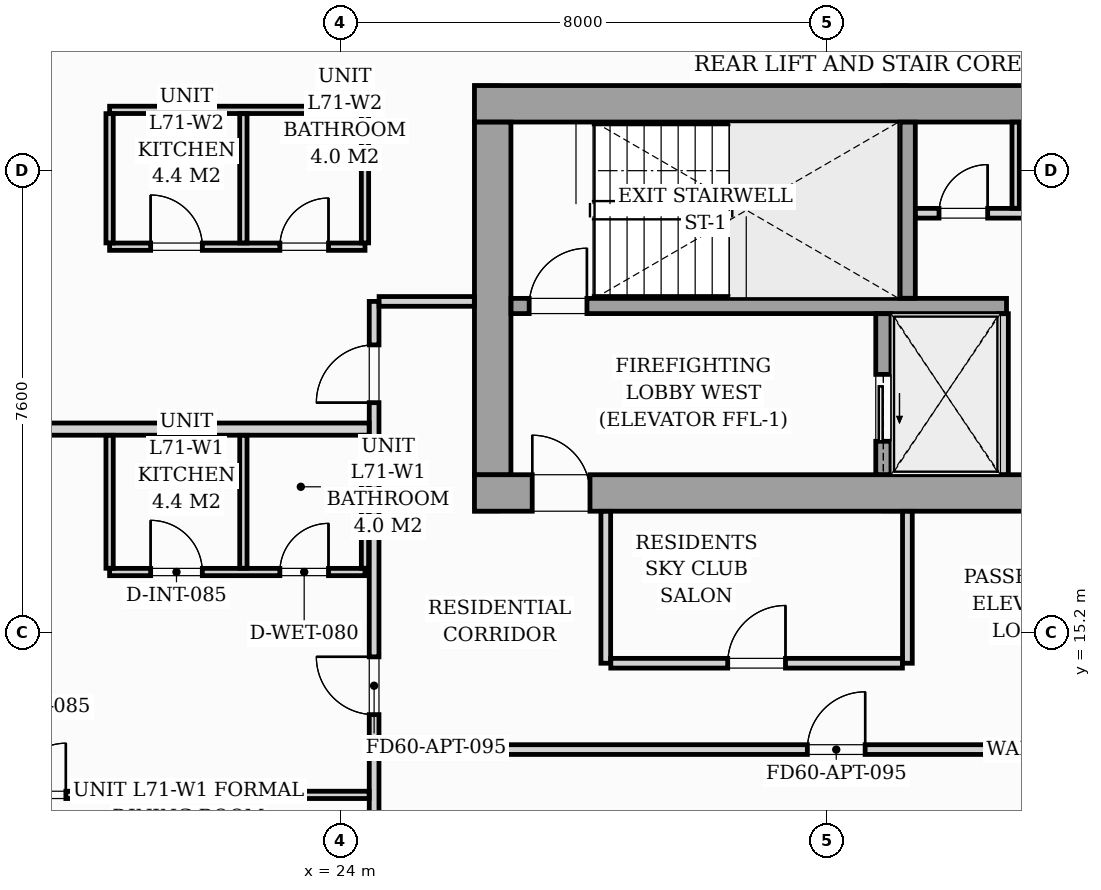
"""IFC4 building model, lengths in metres.
Left out: names, types, materials, properties, quantities, classifications, styles, units other than length and angle.
Written with IfcOpenShell. Run it as: python <this file> out.ifc"""

import sys

from ifc_helpers import new_model, si_unit, direction, frame, frame_2d, origin, origin_2d, place, context, subcontext, project, spatial, rectangle, i_section, extrude, source, transform, mapped, element, fill, save


model = new_model("IFC4")
c1 = context("Model", 3, precision=1e-05, world=origin(), true_north=direction((0.0, 1.0)))
c2 = subcontext(c1, "Body", "Model", "MODEL_VIEW")
j1 = project(units=[si_unit("LENGTHUNIT", "METRE"), si_unit("PLANEANGLEUNIT", "RADIAN")], contexts=[c1])
p1 = place(None, origin())
s1 = spatial("IfcSite", under=j1, at=p1, CompositionType="ELEMENT")
p2 = place(p1, origin())
s2 = spatial("IfcBuilding", under=s1, at=p2, CompositionType="ELEMENT")
p3 = place(p2, frame((0.0, 0.0, 246.3)))
s3 = spatial("IfcBuildingStorey", under=s2, at=p3, CompositionType="ELEMENT", Elevation=246.3)
m1 = source(origin(), c2, "Body", "SweptSolid", [
    extrude(i_section(OverallWidth=0.409, OverallDepth=0.425, WebThickness=0.033, FlangeThickness=0.052, FilletRadius=0.018, at=origin_2d()), origin(), (0.0, 0.0, 1.0), 3.296),
])
for number, where, z_axis, x_axis in (
    (1, (26.4, 17.4, 0.002), (0.0, 0.0, 1.0), (1.0, 0.0, 0.0)),
    (2, (33.12, 17.4, 0.002), (0.0, 0.0, 1.0), (1.0, 0.0, 0.0)),
    (3, (26.4, 24.0, 0.002), (0.0, 0.0, 1.0), (1.0, 0.0, 0.0)),
    (4, (33.12, 24.0, 0.002), (0.0, 0.0, 1.0), (1.0, 0.0, 0.0)),
):
    element("IfcColumn", number, at=place(p3, frame(where, z_axis=z_axis, x_axis=x_axis)), inside=s3, PredefinedType="PILASTER", context=c2, shape_type="MappedRepresentation", body=[
        mapped(m1, transform((0.0, 0.0, 0.0), scale=1.0)),
    ])
p4 = place(p3, frame((26.2, 17.5, 0.0), z_axis=(0.0, 0.0, 1.0), x_axis=(1.0, 0.0, 0.0)))
e5 = element("IfcWall", 5, at=p4, inside=s3, PredefinedType="SHEAR", context=c2, shape_type="SweptSolid", body=[
    extrude(rectangle(XDim=19.6, YDim=0.6, at=frame_2d((9.8, 0.0))), origin(), (0.0, 0.0, 1.0), 3.3),
])
p5 = place(p4, frame((0.95, 0.0, 0.0)))
e6 = element("IfcOpeningElement", 6, at=p5, cuts=e5, PredefinedType="OPENING", context=c2, shape_type="SweptSolid", body=[
    extrude(rectangle(XDim=0.95, YDim=2.06, at=frame_2d((0.475, 1.03))), frame((0.0, 0.31, 0.0), z_axis=(0.0, -1.0, 0.0), x_axis=(1.0, 0.0, 0.0)), (0.0, 0.0, 1.0), 0.62),
])
p6 = place(p4, frame((9.38, 0.0, 0.0)))
e7 = element("IfcOpeningElement", 7, at=p6, cuts=e5, PredefinedType="OPENING", context=c2, shape_type="SweptSolid", body=[
    extrude(rectangle(XDim=0.85, YDim=2.0, at=frame_2d((0.425, 1.0))), frame((0.0, 0.31, 0.0), z_axis=(0.0, -1.0, 0.0), x_axis=(1.0, 0.0, 0.0)), (0.0, 0.0, 1.0), 0.62),
])
p7 = place(p4, frame((17.55, 0.0, 0.0)))
e8 = element("IfcOpeningElement", 8, at=p7, cuts=e5, PredefinedType="OPENING", context=c2, shape_type="SweptSolid", body=[
    extrude(rectangle(XDim=0.95, YDim=2.06, at=frame_2d((0.475, 1.03))), frame((0.0, 0.31, 0.0), z_axis=(0.0, -1.0, 0.0), x_axis=(1.0, 0.0, 0.0)), (0.0, 0.0, 1.0), 0.62),
])
p8 = place(p3, frame((26.2, 23.9, 0.0), z_axis=(0.0, 0.0, 1.0), x_axis=(1.0, 0.0, 0.0)))
e9 = element("IfcWall", 9, at=p8, inside=s3, PredefinedType="SHEAR", context=c2, shape_type="SweptSolid", body=[
    extrude(rectangle(XDim=19.6, YDim=0.6, at=frame_2d((9.8, 0.0))), origin(), (0.0, 0.0, 1.0), 3.3),
])
p9 = place(p3, frame((26.5, 17.802, 0.0), z_axis=(0.0, 0.0, 1.0), x_axis=(0.0, 1.0, 0.0)))
e10 = element("IfcWall", 10, at=p9, inside=s3, PredefinedType="SHEAR", context=c2, shape_type="SweptSolid", body=[
    extrude(rectangle(XDim=5.796, YDim=0.6, at=frame_2d((2.898, 0.0))), origin(), (0.0, 0.0, 1.0), 3.3),
])
p10 = place(p3, frame((26.802, 20.575, 0.0), z_axis=(0.0, 0.0, 1.0), x_axis=(1.0, 0.0, 0.0)))
e11 = element("IfcWall", 11, at=p10, inside=s3, PredefinedType="SOLIDWALL", context=c2, shape_type="SweptSolid", body=[
    extrude(rectangle(XDim=8.148, YDim=0.25, at=frame_2d((4.074, 0.0))), origin(), (0.0, 0.0, 1.0), 3.3),
])
p11 = place(p10, frame((0.298, 0.0, 0.0)))
e12 = element("IfcOpeningElement", 12, at=p11, cuts=e11, PredefinedType="OPENING", context=c2, shape_type="SweptSolid", body=[
    extrude(rectangle(XDim=0.95, YDim=2.06, at=frame_2d((0.475, 1.03))), frame((0.0, 0.135, 0.0), z_axis=(0.0, -1.0, 0.0), x_axis=(1.0, 0.0, 0.0)), (0.0, 0.0, 1.0), 0.27),
])
p12 = place(p3, frame((33.325, 20.702, 0.0), z_axis=(0.0, 0.0, 1.0), x_axis=(0.0, 1.0, 0.0)))
e13 = element("IfcWall", 13, at=p12, inside=s3, PredefinedType="SOLIDWALL", context=c2, shape_type="SweptSolid", body=[
    extrude(rectangle(XDim=2.896, YDim=0.25, at=frame_2d((1.448, 0.0))), origin(), (0.0, 0.0, 1.0), 3.3),
])
p13 = place(p3, frame((32.925, 17.802, 0.0), z_axis=(0.0, 0.0, 1.0), x_axis=(0.0, 1.0, 0.0)))
e14 = element("IfcWall", 14, at=p13, inside=s3, PredefinedType="SOLIDWALL", context=c2, shape_type="SweptSolid", body=[
    extrude(rectangle(XDim=2.646, YDim=0.25, at=frame_2d((1.323, 0.0))), origin(), (0.0, 0.0, 1.0), 3.3),
])
p14 = place(p13, frame((0.548, 0.0, 0.0)))
e15 = element("IfcOpeningElement", 15, at=p14, cuts=e14, PredefinedType="OPENING", context=c2, shape_type="SweptSolid", body=[
    extrude(rectangle(XDim=1.1, YDim=2.08, at=frame_2d((0.55, 1.04))), frame((0.0, 0.135, 0.0), z_axis=(0.0, -1.0, 0.0), x_axis=(1.0, 0.0, 0.0)), (0.0, 0.0, 1.0), 0.27),
])
p15 = place(p3, frame((34.9, 17.802, 0.0), z_axis=(0.0, 0.0, 1.0), x_axis=(0.0, 1.0, 0.0)))
e16 = element("IfcWall", 16, at=p15, inside=s3, PredefinedType="PARTITIONING", context=c2, shape_type="SweptSolid", body=[
    extrude(rectangle(XDim=2.646, YDim=0.16, at=frame_2d((1.323, 0.0))), origin(), (0.0, 0.0, 1.0), 3.04),
])
p16 = place(p3, frame((33.452, 22.1, 0.0), z_axis=(0.0, 0.0, 1.0), x_axis=(1.0, 0.0, 0.0)))
e17 = element("IfcWall", 17, at=p16, inside=s3, PredefinedType="PARTITIONING", context=c2, shape_type="SweptSolid", body=[
    extrude(rectangle(XDim=5.096, YDim=0.16, at=frame_2d((2.548, 0.0))), origin(), (0.0, 0.0, 1.0), 3.04),
])
p17 = place(p16, frame((0.388, 0.0, 0.0)))
e18 = element("IfcOpeningElement", 18, at=p17, cuts=e17, PredefinedType="OPENING", context=c2, shape_type="SweptSolid", body=[
    extrude(rectangle(XDim=0.8, YDim=2.05, at=frame_2d((0.4, 1.025))), frame((0.0, 0.09, 0.0), z_axis=(0.0, -1.0, 0.0), x_axis=(1.0, 0.0, 0.0)), (0.0, 0.0, 1.0), 0.18),
])
p18 = place(p16, frame((2.148, 0.0, 0.0)))
e19 = element("IfcOpeningElement", 19, at=p18, cuts=e17, PredefinedType="OPENING", context=c2, shape_type="SweptSolid", body=[
    extrude(rectangle(XDim=0.8, YDim=2.05, at=frame_2d((0.4, 1.025))), frame((0.0, 0.09, 0.0), z_axis=(0.0, -1.0, 0.0), x_axis=(1.0, 0.0, 0.0)), (0.0, 0.0, 1.0), 0.18),
])
p19 = place(p16, frame((3.908, 0.0, 0.0)))
e20 = element("IfcOpeningElement", 20, at=p19, cuts=e17, PredefinedType="OPENING", context=c2, shape_type="SweptSolid", body=[
    extrude(rectangle(XDim=0.8, YDim=2.05, at=frame_2d((0.4, 1.025))), frame((0.0, 0.09, 0.0), z_axis=(0.0, -1.0, 0.0), x_axis=(1.0, 0.0, 0.0)), (0.0, 0.0, 1.0), 0.18),
])
p20 = place(p3, frame((35.1, 22.182, 0.0), z_axis=(0.0, 0.0, 1.0), x_axis=(0.0, 1.0, 0.0)))
e21 = element("IfcWall", 21, at=p20, inside=s3, PredefinedType="PARTITIONING", context=c2, shape_type="SweptSolid", body=[
    extrude(rectangle(XDim=1.416, YDim=0.12, at=frame_2d((0.708, 0.0))), origin(), (0.0, 0.0, 1.0), 3.04),
])
p21 = place(p3, frame((24.55, 13.28, 0.0), z_axis=(0.0, 0.0, 1.0), x_axis=(1.0, 0.0, 0.0)))
e22 = element("IfcWall", 22, at=p21, inside=s3, PredefinedType="PARTITIONING", context=c2, shape_type="SweptSolid", body=[
    extrude(rectangle(XDim=22.9, YDim=0.16, at=frame_2d((11.45, 0.0))), origin(), (0.0, 0.0, 1.0), 2.556),
])
p22 = place(p21, frame((7.125, 0.0, 0.0)))
e23 = element("IfcOpeningElement", 23, at=p22, cuts=e22, PredefinedType="OPENING", context=c2, shape_type="SweptSolid", body=[
    extrude(rectangle(XDim=0.95, YDim=2.06, at=frame_2d((0.475, 1.03))), frame((0.0, 0.09, 0.0), z_axis=(0.0, -1.0, 0.0), x_axis=(1.0, 0.0, 0.0)), (0.0, 0.0, 1.0), 0.18),
])
p23 = place(p3, frame((24.55, 10.077, 0.0), z_axis=(0.0, 0.0, 1.0), x_axis=(0.0, 1.0, 0.0)))
e24 = element("IfcWall", 24, at=p23, inside=s3, PredefinedType="PARTITIONING", context=c2, shape_type="SweptSolid", body=[
    extrude(rectangle(XDim=3.121, YDim=0.16, at=frame_2d((1.561, 0.0))), origin(), (0.0, 0.0, 1.0), 3.04),
])
p24 = place(p3, frame((24.55, 13.362, 0.0), z_axis=(0.0, 0.0, 1.0), x_axis=(0.0, 1.0, 0.0)))
e25 = element("IfcWall", 25, at=p24, inside=s3, PredefinedType="PARTITIONING", context=c2, shape_type="SweptSolid", body=[
    extrude(rectangle(XDim=7.288, YDim=0.16, at=frame_2d((3.644, 0.0))), origin(), (0.0, 0.0, 1.0), 3.04),
])
p25 = place(p24, frame((0.493, 0.0, 0.0)))
e26 = element("IfcOpeningElement", 26, at=p25, cuts=e25, PredefinedType="OPENING", context=c2, shape_type="SweptSolid", body=[
    extrude(rectangle(XDim=0.95, YDim=2.06, at=frame_2d((0.475, 1.03))), frame((0.0, 0.09, 0.0), z_axis=(0.0, -1.0, 0.0), x_axis=(1.0, 0.0, 0.0)), (0.0, 0.0, 1.0), 0.18),
])
p26 = place(p24, frame((5.623, 0.0, 0.0)))
e27 = element("IfcOpeningElement", 27, at=p26, cuts=e25, PredefinedType="OPENING", context=c2, shape_type="SweptSolid", body=[
    extrude(rectangle(XDim=0.95, YDim=2.06, at=frame_2d((0.475, 1.03))), frame((0.0, 0.09, 0.0), z_axis=(0.0, -1.0, 0.0), x_axis=(1.0, 0.0, 0.0)), (0.0, 0.0, 1.0), 0.18),
])
p27 = place(p3, frame((24.632, 20.65, 0.0), z_axis=(0.0, 0.0, 1.0), x_axis=(1.0, 0.0, 0.0)))
e28 = element("IfcWall", 28, at=p27, inside=s3, PredefinedType="PARTITIONING", context=c2, shape_type="SweptSolid", body=[
    extrude(rectangle(XDim=1.566, YDim=0.16, at=frame_2d((0.783, 0.0))), origin(), (0.0, 0.0, 1.0), 3.04),
])
p28 = place(p3, frame((9.434, 18.55, 0.0), z_axis=(0.0, 0.0, 1.0), x_axis=(1.0, 0.0, 0.0)))
e29 = element("IfcWall", 29, at=p28, inside=s3, PredefinedType="PARTITIONING", context=c2, shape_type="SweptSolid", body=[
    extrude(rectangle(XDim=15.034, YDim=0.2, at=frame_2d((7.517, 0.0))), origin(), (0.0, 0.0, 1.0), 2.381),
])
p29 = place(p3, frame((20.2, 16.2, 0.0), z_axis=(0.0, 0.0, 1.0), x_axis=(1.0, 0.0, 0.0)))
e30 = element("IfcWall", 30, at=p29, inside=s3, PredefinedType="PARTITIONING", context=c2, shape_type="SweptSolid", body=[
    extrude(rectangle(XDim=4.2, YDim=0.12, at=frame_2d((2.1, 0.0))), origin(), (0.0, 0.0, 1.0), 3.04),
])
p30 = place(p29, frame((0.675, 0.0, 0.0)))
e31 = element("IfcOpeningElement", 31, at=p30, cuts=e30, PredefinedType="OPENING", context=c2, shape_type="SweptSolid", body=[
    extrude(rectangle(XDim=0.85, YDim=2.05, at=frame_2d((0.425, 1.025))), frame((0.0, 0.07, 0.0), z_axis=(0.0, -1.0, 0.0), x_axis=(1.0, 0.0, 0.0)), (0.0, 0.0, 1.0), 0.14),
])
p31 = place(p29, frame((2.8, 0.0, 0.0)))
e32 = element("IfcOpeningElement", 32, at=p31, cuts=e30, PredefinedType="OPENING", context=c2, shape_type="SweptSolid", body=[
    extrude(rectangle(XDim=0.8, YDim=2.02, at=frame_2d((0.4, 1.01))), frame((0.0, 0.07, 0.0), z_axis=(0.0, -1.0, 0.0), x_axis=(1.0, 0.0, 0.0)), (0.0, 0.0, 1.0), 0.14),
])
for number, where, z_axis, x_axis in (
    (33, (20.2, 16.262, 0.0), (0.0, 0.0, 1.0), (0.0, 1.0, 0.0)),
    (34, (22.4, 16.262, 0.0), (0.0, 0.0, 1.0), (0.0, 1.0, 0.0)),
    (35, (24.4, 16.262, 0.0), (0.0, 0.0, 1.0), (0.0, 1.0, 0.0)),
):
    element("IfcWall", number, at=place(p3, frame(where, z_axis=z_axis, x_axis=x_axis)), inside=s3, PredefinedType="PARTITIONING", context=c2, shape_type="SweptSolid", body=[
        extrude(rectangle(XDim=2.186, YDim=0.12, at=frame_2d((1.093, 0.0))), origin(), (0.0, 0.0, 1.0), 3.04),
    ])
p32 = place(p3, frame((13.643, 12.535, 0.0), z_axis=(0.0, 0.0, 1.0), x_axis=(1.0, 0.0, 0.0)))
e36 = element("IfcWall", 36, at=p32, inside=s3, PredefinedType="PARTITIONING", context=c2, shape_type="SweptSolid", body=[
    extrude(rectangle(XDim=10.825, YDim=0.12, at=frame_2d((5.413, 0.0))), origin(), (0.0, 0.0, 1.0), 3.04),
])
p33 = place(p32, frame((4.988, 0.0, 0.0)))
e37 = element("IfcOpeningElement", 37, at=p33, cuts=e36, PredefinedType="OPENING", context=c2, shape_type="SweptSolid", body=[
    extrude(rectangle(XDim=0.85, YDim=2.05, at=frame_2d((0.425, 1.025))), frame((0.0, 0.07, 0.0), z_axis=(0.0, -1.0, 0.0), x_axis=(1.0, 0.0, 0.0)), (0.0, 0.0, 1.0), 0.14),
])
p34 = place(p3, frame((20.2, 21.55, 0.0), z_axis=(0.0, 0.0, 1.0), x_axis=(1.0, 0.0, 0.0)))
e38 = element("IfcWall", 38, at=p34, inside=s3, PredefinedType="PARTITIONING", context=c2, shape_type="SweptSolid", body=[
    extrude(rectangle(XDim=4.2, YDim=0.12, at=frame_2d((2.1, 0.0))), origin(), (0.0, 0.0, 1.0), 3.04),
])
p35 = place(p34, frame((0.675, 0.0, 0.0)))
e39 = element("IfcOpeningElement", 39, at=p35, cuts=e38, PredefinedType="OPENING", context=c2, shape_type="SweptSolid", body=[
    extrude(rectangle(XDim=0.85, YDim=2.05, at=frame_2d((0.425, 1.025))), frame((0.0, 0.07, 0.0), z_axis=(0.0, -1.0, 0.0), x_axis=(1.0, 0.0, 0.0)), (0.0, 0.0, 1.0), 0.14),
])
p36 = place(p34, frame((2.8, 0.0, 0.0)))
e40 = element("IfcOpeningElement", 40, at=p36, cuts=e38, PredefinedType="OPENING", context=c2, shape_type="SweptSolid", body=[
    extrude(rectangle(XDim=0.8, YDim=2.02, at=frame_2d((0.4, 1.01))), frame((0.0, 0.07, 0.0), z_axis=(0.0, -1.0, 0.0), x_axis=(1.0, 0.0, 0.0)), (0.0, 0.0, 1.0), 0.14),
])
p37 = place(p3, frame((20.2, 23.8, 0.0), z_axis=(0.0, 0.0, 1.0), x_axis=(1.0, 0.0, 0.0)))
e41 = element("IfcWall", 41, at=p37, inside=s3, PredefinedType="PARTITIONING", context=c2, shape_type="SweptSolid", body=[
    extrude(rectangle(XDim=4.2, YDim=0.12, at=frame_2d((2.1, 0.0))), origin(), (0.0, 0.0, 1.0), 3.04),
])
for number, where, z_axis, x_axis in (
    (42, (20.2, 21.612, 0.0), (0.0, 0.0, 1.0), (0.0, 1.0, 0.0)),
    (43, (22.4, 21.612, 0.0), (0.0, 0.0, 1.0), (0.0, 1.0, 0.0)),
    (44, (24.4, 21.612, 0.0), (0.0, 0.0, 1.0), (0.0, 1.0, 0.0)),
):
    element("IfcWall", number, at=place(p3, frame(where, z_axis=z_axis, x_axis=x_axis)), inside=s3, PredefinedType="PARTITIONING", context=c2, shape_type="SweptSolid", body=[
        extrude(rectangle(XDim=2.126, YDim=0.12, at=frame_2d((1.063, 0.0))), origin(), (0.0, 0.0, 1.0), 3.04),
    ])
for number, where, z_axis, x_axis in (
    (45, (28.36, 14.7, 0.0), (0.0, 0.0, 1.0), (0.0, 1.0, 0.0)),
    (46, (33.32, 14.7, 0.0), (0.0, 0.0, 1.0), (0.0, 1.0, 0.0)),
):
    element("IfcWall", number, at=place(p3, frame(where, z_axis=z_axis, x_axis=x_axis)), inside=s3, PredefinedType="PARTITIONING", context=c2, shape_type="SweptSolid", body=[
        extrude(rectangle(XDim=2.498, YDim=0.16, at=frame_2d((1.249, 0.0))), origin(), (0.0, 0.0, 1.0), 3.04),
    ])
p38 = place(p3, frame((28.442, 14.7, 0.0), z_axis=(0.0, 0.0, 1.0), x_axis=(1.0, 0.0, 0.0)))
e47 = element("IfcWall", 47, at=p38, inside=s3, PredefinedType="PARTITIONING", context=c2, shape_type="SweptSolid", body=[
    extrude(rectangle(XDim=4.796, YDim=0.16, at=frame_2d((2.398, 0.0))), origin(), (0.0, 0.0, 1.0), 2.556),
])
p39 = place(p38, frame((1.923, 0.0, 0.0)))
e48 = element("IfcOpeningElement", 48, at=p39, cuts=e47, PredefinedType="OPENING", context=c2, shape_type="SweptSolid", body=[
    extrude(rectangle(XDim=0.95, YDim=2.06, at=frame_2d((0.475, 1.03))), frame((0.0, 0.09, 0.0), z_axis=(0.0, -1.0, 0.0), x_axis=(1.0, 0.0, 0.0)), (0.0, 0.0, 1.0), 0.18),
])
m2 = source(origin(), c2, "Body", "SweptSolid", [
    extrude(rectangle(XDim=0.95, YDim=2.06, at=frame_2d((0.475, 1.03))), frame((0.0, 0.025, 0.0), z_axis=(0.0, -1.0, 0.0), x_axis=(1.0, 0.0, 0.0)), (0.0, 0.0, 1.0), 0.05),
])
p40 = place(p5, origin())
e49 = element("IfcDoor", 49, at=p40, inside=s3, OperationType="SINGLE_SWING_LEFT", PredefinedType="DOOR", context=c2, shape_type="MappedRepresentation", body=[
    mapped(m2, transform((0.0, 0.0, 0.0), scale=1.0)),
])
fill(e6, e49)
p41 = place(p11, origin())
e50 = element("IfcDoor", 50, at=p41, inside=s3, OperationType="SINGLE_SWING_RIGHT", PredefinedType="DOOR", context=c2, shape_type="MappedRepresentation", body=[
    mapped(m2, transform((0.0, 0.0, 0.0), scale=1.0)),
])
fill(e12, e50)
m3 = source(origin(), c2, "Body", "SweptSolid", [
    extrude(rectangle(XDim=1.1, YDim=2.08, at=frame_2d((0.55, 1.04))), frame((0.0, 0.025, 0.0), z_axis=(0.0, -1.0, 0.0), x_axis=(1.0, 0.0, 0.0)), (0.0, 0.0, 1.0), 0.05),
])
p42 = place(p14, origin())
e51 = element("IfcDoor", 51, at=p42, inside=s3, OperationType="SLIDING_TO_LEFT", PredefinedType="DOOR", context=c2, shape_type="MappedRepresentation", body=[
    mapped(m3, transform((0.0, 0.0, 0.0), scale=1.0)),
])
fill(e15, e51)
m4 = source(origin(), c2, "Body", "SweptSolid", [
    extrude(rectangle(XDim=0.8, YDim=2.05, at=frame_2d((0.4, 1.025))), frame((0.0, 0.025, 0.0), z_axis=(0.0, -1.0, 0.0), x_axis=(1.0, 0.0, 0.0)), (0.0, 0.0, 1.0), 0.05),
])
p43 = place(p17, origin())
e52 = element("IfcDoor", 52, at=p43, inside=s3, OperationType="SINGLE_SWING_RIGHT", PredefinedType="DOOR", context=c2, shape_type="MappedRepresentation", body=[
    mapped(m4, transform((0.0, 0.0, 0.0), scale=1.0)),
])
fill(e18, e52)
m5 = source(origin(), c2, "Body", "SweptSolid", [
    extrude(rectangle(XDim=0.95, YDim=2.06, at=frame_2d((0.475, 1.03))), frame((0.0, 0.025, 0.0), z_axis=(0.0, -1.0, 0.0), x_axis=(1.0, 0.0, 0.0)), (0.0, 0.0, 1.0), 0.05),
])
p44 = place(p22, origin())
e53 = element("IfcDoor", 53, at=p44, inside=s3, OperationType="SINGLE_SWING_RIGHT", PredefinedType="DOOR", context=c2, shape_type="MappedRepresentation", body=[
    mapped(m5, transform((0.0, 0.0, 0.0), scale=1.0)),
])
fill(e23, e53)
p45 = place(p25, origin())
e54 = element("IfcDoor", 54, at=p45, inside=s3, OperationType="SINGLE_SWING_RIGHT", PredefinedType="DOOR", context=c2, shape_type="MappedRepresentation", body=[
    mapped(m5, transform((0.0, 0.0, 0.0), scale=1.0)),
])
fill(e26, e54)
m6 = source(origin(), c2, "Body", "SweptSolid", [
    extrude(rectangle(XDim=0.85, YDim=2.05, at=frame_2d((0.425, 1.025))), frame((0.0, 0.025, 0.0), z_axis=(0.0, -1.0, 0.0), x_axis=(1.0, 0.0, 0.0)), (0.0, 0.0, 1.0), 0.05),
])
p46 = place(p33, origin())
e55 = element("IfcDoor", 55, at=p46, inside=s3, OperationType="SINGLE_SWING_RIGHT", PredefinedType="DOOR", context=c2, shape_type="MappedRepresentation", body=[
    mapped(m6, transform((0.0, 0.0, 0.0), scale=1.0)),
])
fill(e37, e55)
p47 = place(p30, origin())
e56 = element("IfcDoor", 56, at=p47, inside=s3, OperationType="SINGLE_SWING_LEFT", PredefinedType="DOOR", context=c2, shape_type="MappedRepresentation", body=[
    mapped(m6, transform((0.0, 0.0, 0.0), scale=1.0)),
])
fill(e31, e56)
m7 = source(origin(), c2, "Body", "SweptSolid", [
    extrude(rectangle(XDim=0.8, YDim=2.02, at=frame_2d((0.4, 1.01))), frame((0.0, 0.025, 0.0), z_axis=(0.0, -1.0, 0.0), x_axis=(1.0, 0.0, 0.0)), (0.0, 0.0, 1.0), 0.05),
])
p48 = place(p31, origin())
e57 = element("IfcDoor", 57, at=p48, inside=s3, OperationType="SINGLE_SWING_RIGHT", PredefinedType="DOOR", context=c2, shape_type="MappedRepresentation", body=[
    mapped(m7, transform((0.0, 0.0, 0.0), scale=1.0)),
])
fill(e32, e57)
p49 = place(p26, origin())
e58 = element("IfcDoor", 58, at=p49, inside=s3, OperationType="SINGLE_SWING_LEFT", PredefinedType="DOOR", context=c2, shape_type="MappedRepresentation", body=[
    mapped(m5, transform((0.0, 0.0, 0.0), scale=1.0)),
])
fill(e27, e58)
p50 = place(p35, origin())
e59 = element("IfcDoor", 59, at=p50, inside=s3, OperationType="SINGLE_SWING_LEFT", PredefinedType="DOOR", context=c2, shape_type="MappedRepresentation", body=[
    mapped(m6, transform((0.0, 0.0, 0.0), scale=1.0)),
])
fill(e39, e59)
p51 = place(p36, origin())
e60 = element("IfcDoor", 60, at=p51, inside=s3, OperationType="SINGLE_SWING_RIGHT", PredefinedType="DOOR", context=c2, shape_type="MappedRepresentation", body=[
    mapped(m7, transform((0.0, 0.0, 0.0), scale=1.0)),
])
fill(e40, e60)
p52 = place(p39, origin())
e61 = element("IfcDoor", 61, at=p52, inside=s3, OperationType="SINGLE_SWING_RIGHT", PredefinedType="DOOR", context=c2, shape_type="MappedRepresentation", body=[
    mapped(m5, transform((0.0, 0.0, 0.0), scale=1.0)),
])
fill(e48, e61)
save(model, sys.argv[1])
